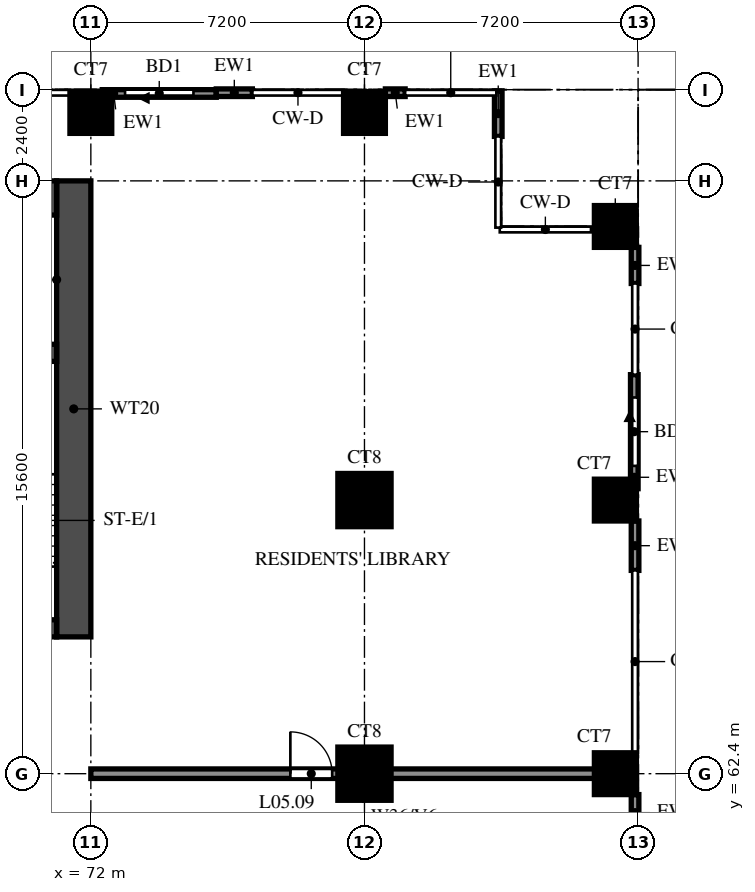
"""IFC4 building model, lengths in metres.
Left out: names, types, materials, properties, quantities, classifications, styles, units other than length and angle.
Written with IfcOpenShell. Run it as: python <this file> out.ifc"""

import sys

from ifc_helpers import new_model, si_unit, direction, frame, frame_2d, origin, origin_2d, place, context, subcontext, project, spatial, rectangle, extrude, source, transform, mapped, element, fill, save


model = new_model("IFC4")
c1 = context("Model", 3, precision=1e-05, world=origin(), true_north=direction((0.0, 1.0)))
c2 = subcontext(c1, "Body", "Model", "MODEL_VIEW")
j1 = project(units=[si_unit("LENGTHUNIT", "METRE"), si_unit("PLANEANGLEUNIT", "RADIAN")], contexts=[c1])
p1 = place(None, origin())
s1 = spatial("IfcSite", under=j1, at=p1, CompositionType="ELEMENT")
p2 = place(p1, origin())
s2 = spatial("IfcBuilding", under=s1, at=p2, CompositionType="ELEMENT")
p3 = place(p2, frame((0.0, 0.0, 27.0)))
s3 = spatial("IfcBuildingStorey", under=s2, at=p3, CompositionType="ELEMENT", Elevation=27.0)
m1 = source(origin(), c2, "Body", "SweptSolid", [
    extrude(rectangle(XDim=1.4, YDim=1.4, at=origin_2d()), origin(), (0.0, 0.0, 1.0), 3.18),
])
p4 = place(p3, frame((79.2, 62.4, 0.0), z_axis=(0.0, 0.0, 1.0), x_axis=(1.0, 0.0, 0.0)))
e1 = element("IfcColumn", 1, at=p4, inside=s3, PredefinedType="COLUMN", context=c2, shape_type="MappedRepresentation", body=[
    mapped(m1, transform((0.0, 0.0, 0.0))),
])
m2 = source(origin(), c2, "Body", "SweptSolid", [
    extrude(rectangle(XDim=1.1, YDim=1.1, at=origin_2d()), origin(), (0.0, 0.0, 1.0), 3.18),
])
p5 = place(p3, frame((85.8, 62.4, 0.0), z_axis=(0.0, 0.0, 1.0), x_axis=(1.0, 0.0, 0.0)))
e2 = element("IfcColumn", 2, at=p5, inside=s3, PredefinedType="COLUMN", context=c2, shape_type="MappedRepresentation", body=[
    mapped(m2, transform((0.0, 0.0, 0.0))),
])
p6 = place(p3, frame((79.2, 69.6, 0.0), z_axis=(0.0, 0.0, 1.0), x_axis=(1.0, 0.0, 0.0)))
e3 = element("IfcColumn", 3, at=p6, inside=s3, PredefinedType="COLUMN", context=c2, shape_type="MappedRepresentation", body=[
    mapped(m1, transform((0.0, 0.0, 0.0))),
])
for number, where, z_axis, x_axis in (
    (4, (85.8, 69.6, 0.0), (0.0, 0.0, 1.0), (1.0, 0.0, 0.0)),
    (5, (85.8, 76.8, 0.0), (0.0, 0.0, 1.0), (1.0, 0.0, 0.0)),
    (6, (72.0, 79.8, 0.0), (0.0, 0.0, 1.0), (1.0, 0.0, 0.0)),
    (7, (79.2, 79.8, 0.0), (0.0, 0.0, 1.0), (1.0, 0.0, 0.0)),
):
    element("IfcColumn", number, at=place(p3, frame(where, z_axis=z_axis, x_axis=x_axis)), inside=s3, PredefinedType="COLUMN", context=c2, shape_type="MappedRepresentation", body=[
        mapped(m2, transform((0.0, 0.0, 0.0))),
    ])
p7 = place(p3, frame((71.55, 66.0, 0.0), z_axis=(0.0, 0.0, 1.0), x_axis=(0.0, 1.0, 0.0)))
e8 = element("IfcWall", 8, at=p7, inside=s3, PredefinedType="SHEAR", context=c2, shape_type="SweptSolid", body=[
    extrude(rectangle(XDim=12.0, YDim=0.9, at=frame_2d((6.0, 0.0))), origin(), (0.0, 0.0, 1.0), 3.18),
])
p8 = place(p3, frame((29.7, 77.55, 0.0), z_axis=(0.0, 0.0, 1.0), x_axis=(1.0, 0.0, 0.0)))
e9 = element("IfcWall", 9, at=p8, inside=s3, PredefinedType="SHEAR", context=c2, shape_type="SweptSolid", body=[
    extrude(rectangle(XDim=41.4, YDim=0.9, at=frame_2d((20.7, 0.0))), origin(), (0.0, 0.0, 1.0), 3.18),
])
p9 = place(p3, frame((29.7, 66.225, 0.0), z_axis=(0.0, 0.0, 1.0), x_axis=(1.0, 0.0, 0.0)))
e10 = element("IfcWall", 10, at=p9, inside=s3, PredefinedType="SHEAR", context=c2, shape_type="SweptSolid", body=[
    extrude(rectangle(XDim=41.4, YDim=0.45, at=frame_2d((20.7, 0.0))), origin(), (0.0, 0.0, 1.0), 3.18),
])
p10 = place(p9, frame((0.925, 0.0, 0.0)))
e11 = element("IfcOpeningElement", 11, at=p10, cuts=e10, PredefinedType="OPENING", context=c2, shape_type="SweptSolid", body=[
    extrude(rectangle(XDim=1.1, YDim=2.1, at=frame_2d((0.55, 1.05))), frame((0.0, 0.235, 0.0), z_axis=(0.0, -1.0, 0.0), x_axis=(1.0, 0.0, 0.0)), (0.0, 0.0, 1.0), 0.47),
])
p11 = place(p9, frame((3.738, 0.0, 0.0)))
e12 = element("IfcOpeningElement", 12, at=p11, cuts=e10, PredefinedType="OPENING", context=c2, shape_type="SweptSolid", body=[
    extrude(rectangle(XDim=1.8, YDim=2.1, at=frame_2d((0.9, 1.05))), frame((0.0, 0.235, 0.0), z_axis=(0.0, -1.0, 0.0), x_axis=(1.0, 0.0, 0.0)), (0.0, 0.0, 1.0), 0.47),
])
p12 = place(p3, frame((67.925, 73.475, 0.0), z_axis=(0.0, 0.0, 1.0), x_axis=(1.0, 0.0, 0.0)))
e13 = element("IfcWall", 13, at=p12, inside=s3, PredefinedType="SHEAR", context=c2, shape_type="SweptSolid", body=[
    extrude(rectangle(XDim=3.175, YDim=0.45, at=frame_2d((1.587, 0.0))), origin(), (0.0, 0.0, 1.0), 3.18),
])
p13 = place(p3, frame((86.3, 69.9, 0.0), z_axis=(0.0, 0.0, 1.0), x_axis=(0.0, 1.0, 0.0)))
e14 = element("IfcWall", 14, at=p13, inside=s3, PredefinedType="SOLIDWALL", context=c2, shape_type="SweptSolid", body=[
    extrude(rectangle(XDim=3.0, YDim=0.2, at=frame_2d((1.5, 0.0))), origin(), (0.0, 0.0, 1.0), 3.18),
])
p14 = place(p13, frame((0.6, 0.0, 0.0)))
e15 = element("IfcOpeningElement", 15, at=p14, cuts=e14, PredefinedType="OPENING", context=c2, shape_type="SweptSolid", body=[
    extrude(rectangle(XDim=1.8, YDim=2.4, at=frame_2d((0.9, 1.2))), frame((0.0, 0.11, 0.0), z_axis=(0.0, -1.0, 0.0), x_axis=(1.0, 0.0, 0.0)), (0.0, 0.0, 1.0), 0.22),
])
p15 = place(p3, frame((86.32, 60.9, 0.0), z_axis=(0.0, 0.0, 1.0), x_axis=(0.0, 1.0, 0.0)))
e16 = element("IfcWall", 16, at=p15, inside=s3, PredefinedType="SOLIDWALL", context=c2, shape_type="SweptSolid", body=[
    extrude(rectangle(XDim=0.95, YDim=0.2, at=frame_2d((0.475, 0.0))), origin(), (0.0, 0.0, 1.0), 3.18),
])
p16 = place(p3, frame((86.32, 67.75, 0.0), z_axis=(0.0, 0.0, 1.0), x_axis=(0.0, 1.0, 0.0)))
e17 = element("IfcWall", 17, at=p16, inside=s3, PredefinedType="SOLIDWALL", context=c2, shape_type="SweptSolid", body=[
    extrude(rectangle(XDim=1.3, YDim=0.2, at=frame_2d((0.65, 0.0))), origin(), (0.0, 0.0, 1.0), 3.18),
])
p17 = place(p3, frame((86.32, 75.3, 0.0), z_axis=(0.0, 0.0, 1.0), x_axis=(0.0, 1.0, 0.0)))
e18 = element("IfcWall", 18, at=p17, inside=s3, PredefinedType="SOLIDWALL", context=c2, shape_type="SweptSolid", body=[
    extrude(rectangle(XDim=0.95, YDim=0.2, at=frame_2d((0.475, 0.0))), origin(), (0.0, 0.0, 1.0), 3.18),
])
p18 = place(p3, frame((82.72, 79.17, 0.0), z_axis=(0.0, 0.0, 1.0), x_axis=(0.0, 1.0, 0.0)))
e19 = element("IfcWall", 19, at=p18, inside=s3, PredefinedType="SOLIDWALL", context=c2, shape_type="SweptSolid", body=[
    extrude(rectangle(XDim=1.2, YDim=0.2, at=frame_2d((0.6, 0.0))), origin(), (0.0, 0.0, 1.0), 3.18),
])
p19 = place(p3, frame((75.3, 80.3, 0.0), z_axis=(0.0, 0.0, 1.0), x_axis=(-1.0, 0.0, 0.0)))
e20 = element("IfcWall", 20, at=p19, inside=s3, PredefinedType="SOLIDWALL", context=c2, shape_type="SweptSolid", body=[
    extrude(rectangle(XDim=3.0, YDim=0.2, at=frame_2d((1.5, 0.0))), origin(), (0.0, 0.0, 1.0), 3.18),
])
p20 = place(p19, frame((0.6, 0.0, 0.0)))
e21 = element("IfcOpeningElement", 21, at=p20, cuts=e20, PredefinedType="OPENING", context=c2, shape_type="SweptSolid", body=[
    extrude(rectangle(XDim=1.8, YDim=2.4, at=frame_2d((0.9, 1.2))), frame((0.0, 0.11, 0.0), z_axis=(0.0, -1.0, 0.0), x_axis=(1.0, 0.0, 0.0)), (0.0, 0.0, 1.0), 0.22),
])
p21 = place(p3, frame((80.27, 80.32, 0.0), z_axis=(0.0, 0.0, 1.0), x_axis=(-1.0, 0.0, 0.0)))
e22 = element("IfcWall", 22, at=p21, inside=s3, PredefinedType="SOLIDWALL", context=c2, shape_type="SweptSolid", body=[
    extrude(rectangle(XDim=0.52, YDim=0.2, at=frame_2d((0.26, 0.0))), origin(), (0.0, 0.0, 1.0), 3.18),
])
p22 = place(p3, frame((76.25, 80.32, 0.0), z_axis=(0.0, 0.0, 1.0), x_axis=(-1.0, 0.0, 0.0)))
e23 = element("IfcWall", 23, at=p22, inside=s3, PredefinedType="SOLIDWALL", context=c2, shape_type="SweptSolid", body=[
    extrude(rectangle(XDim=0.95, YDim=0.2, at=frame_2d((0.475, 0.0))), origin(), (0.0, 0.0, 1.0), 3.18),
])
p23 = place(p3, frame((72.0, 62.4, 0.0), z_axis=(0.0, 0.0, 1.0), x_axis=(1.0, 0.0, 0.0)))
e24 = element("IfcWall", 24, at=p23, inside=s3, PredefinedType="SOLIDWALL", context=c2, shape_type="SweptSolid", body=[
    extrude(rectangle(XDim=14.23, YDim=0.25, at=frame_2d((7.115, 0.0))), origin(), (0.0, 0.0, 1.0), 3.18),
])
p24 = place(p23, frame((5.25, 0.0, 0.0)))
e25 = element("IfcOpeningElement", 25, at=p24, cuts=e24, PredefinedType="OPENING", context=c2, shape_type="SweptSolid", body=[
    extrude(rectangle(XDim=1.1, YDim=2.1, at=frame_2d((0.55, 1.05))), frame((0.0, 0.135, 0.0), z_axis=(0.0, -1.0, 0.0), x_axis=(1.0, 0.0, 0.0)), (0.0, 0.0, 1.0), 0.27),
])
p25 = place(p14, origin())
e26 = element("IfcDoor", 26, at=p25, inside=s3, OperationType="DOUBLE_DOOR_SLIDING", PredefinedType="DOOR", context=c2, shape_type="SweptSolid", body=[
    extrude(rectangle(XDim=1.8, YDim=2.4, at=frame_2d((0.9, 1.2))), frame((0.0, 0.025, 0.0), z_axis=(0.0, -1.0, 0.0), x_axis=(1.0, 0.0, 0.0)), (0.0, 0.0, 1.0), 0.05),
])
fill(e15, e26)
p26 = place(p20, origin())
e27 = element("IfcDoor", 27, at=p26, inside=s3, OperationType="DOUBLE_DOOR_SLIDING", PredefinedType="DOOR", context=c2, shape_type="SweptSolid", body=[
    extrude(rectangle(XDim=1.8, YDim=2.4, at=frame_2d((0.9, 1.2))), frame((0.0, 0.025, 0.0), z_axis=(0.0, -1.0, 0.0), x_axis=(1.0, 0.0, 0.0)), (0.0, 0.0, 1.0), 0.05),
])
fill(e21, e27)
p27 = place(p24, origin())
e28 = element("IfcDoor", 28, at=p27, inside=s3, OperationType="SINGLE_SWING_LEFT", PredefinedType="DOOR", context=c2, shape_type="SweptSolid", body=[
    extrude(rectangle(XDim=1.1, YDim=2.1, at=frame_2d((0.55, 1.05))), frame((0.0, 0.025, 0.0), z_axis=(0.0, -1.0, 0.0), x_axis=(1.0, 0.0, 0.0)), (0.0, 0.0, 1.0), 0.05),
])
fill(e25, e28)
save(model, sys.argv[1])
